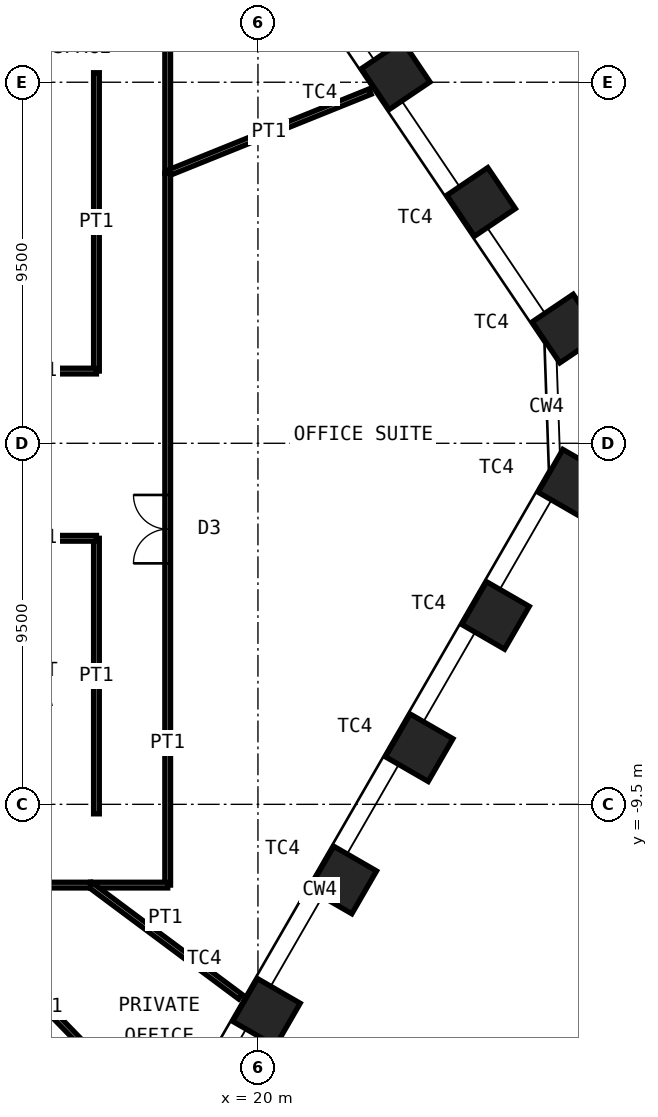
"""IFC4 building model, lengths in metres.
Left out: names, types, materials, properties, quantities, classifications, styles, units other than length and angle.
Written with IfcOpenShell. Run it as: python <this file> out.ifc"""

import sys

from ifc_helpers import new_model, si_unit, direction, frame, frame_2d, origin, origin_2d, place, context, subcontext, project, spatial, rectangle, hollow_rectangle, extrude, element, fill, save


model = new_model("IFC4")
c1 = context("Model", 3, precision=1e-05, world=origin(), true_north=direction((0.0, 1.0)))
c2 = subcontext(c1, "Body", "Model", "MODEL_VIEW")
j1 = project(units=[si_unit("LENGTHUNIT", "METRE"), si_unit("PLANEANGLEUNIT", "RADIAN")], contexts=[c1])
p1 = place(None, origin())
s1 = spatial("IfcSite", under=j1, at=p1, CompositionType="ELEMENT")
p2 = place(p1, origin())
s2 = spatial("IfcBuilding", under=s1, at=p2, CompositionType="ELEMENT")
p3 = place(p2, frame((0.0, 0.0, 166.0)))
s3 = spatial("IfcBuildingStorey", under=s2, at=p3, CompositionType="ELEMENT", Elevation=166.0)
for number, where, z_axis, x_axis in (
    (1, (23.625, 9.682, 0.0), (0.0, 0.0, 1.0), (-0.559, 0.829, 0.0)),
    (2, (25.872, 6.351, 0.0), (0.0, 0.0, 1.0), (-0.559, 0.829, 0.0)),
    (3, (28.119, 3.019, 0.0), (0.0, 0.0, 1.0), (-0.559, 0.829, 0.0)),
    (4, (28.261, -1.05, 0.0), (0.0, 0.0, 1.0), (0.5, 0.866, 0.0)),
    (5, (26.252, -4.53, 0.0), (0.0, 0.0, 1.0), (0.5, 0.866, 0.0)),
    (6, (24.242, -8.011, 0.0), (0.0, 0.0, 1.0), (0.5, 0.866, 0.0)),
    (7, (22.233, -11.491, 0.0), (0.0, 0.0, 1.0), (0.5, 0.866, 0.0)),
    (8, (20.223, -14.972, 0.0), (0.0, 0.0, 1.0), (0.5, 0.866, 0.0)),
):
    element("IfcColumn", number, at=place(p3, frame(where, z_axis=z_axis, x_axis=x_axis)), inside=s3, PredefinedType="COLUMN", context=c2, shape_type="SweptSolid", body=[
        extrude(hollow_rectangle(XDim=1.3, YDim=1.3, WallThickness=0.1, at=origin_2d()), origin(), (0.0, 0.0, 1.0), 4.2),
    ])
p4 = place(p3, frame((17.625, 11.625, 0.0), z_axis=(0.0, 0.0, 1.0), x_axis=(0.0, -1.0, 0.0)))
e9 = element("IfcWall", 9, at=p4, inside=s3, PredefinedType="PARTITIONING", context=c2, shape_type="SweptSolid", body=[
    extrude(rectangle(XDim=4.519, YDim=0.15, at=frame_2d((2.26, 0.0))), origin(), (0.0, 0.0, 1.0), 4.03),
])
p5 = place(p3, frame((22.951, 9.254, 0.0), z_axis=(0.0, 0.0, 1.0), x_axis=(-0.927444087873, -0.373961848147, 0.0)))
e10 = element("IfcWall", 10, at=p5, inside=s3, PredefinedType="PARTITIONING", context=c2, shape_type="SweptSolid", body=[
    extrude(rectangle(XDim=5.743, YDim=0.15, at=frame_2d((2.872, 0.0))), origin(), (0.0, 0.0, 1.0), 2.93),
])
p6 = place(p3, frame((17.625, 7.106, 0.0), z_axis=(0.0, 0.0, 1.0), x_axis=(0.0, -1.0, 0.0)))
e11 = element("IfcWall", 11, at=p6, inside=s3, PredefinedType="PARTITIONING", context=c2, shape_type="SweptSolid", body=[
    extrude(rectangle(XDim=18.731, YDim=0.15, at=frame_2d((9.365, 0.0))), origin(), (0.0, 0.0, 1.0), 4.03),
])
p7 = place(p6, frame((8.466, 0.0, 0.0)))
e12 = element("IfcOpeningElement", 12, at=p7, cuts=e11, PredefinedType="OPENING", context=c2, shape_type="SweptSolid", body=[
    extrude(rectangle(XDim=1.8, YDim=2.4, at=frame_2d((0.9, 1.2))), frame((0.0, 0.085, 0.0), z_axis=(0.0, -1.0, 0.0), x_axis=(1.0, 0.0, 0.0)), (0.0, 0.0, 1.0), 0.17),
])
p8 = place(p3, frame((17.625, -11.625, 0.0), z_axis=(0.0, 0.0, 1.0), x_axis=(-1.0, 0.0, 0.0)))
e13 = element("IfcWall", 13, at=p8, inside=s3, PredefinedType="PARTITIONING", context=c2, shape_type="SweptSolid", body=[
    extrude(rectangle(XDim=2.029, YDim=0.15, at=frame_2d((1.014, 0.0))), origin(), (0.0, 0.0, 1.0), 4.03),
])
p9 = place(p3, frame((19.537, -14.562, 0.0), z_axis=(0.0, 0.0, 1.0), x_axis=(-0.801778753003, 0.597620976233, 0.0)))
e14 = element("IfcWall", 14, at=p9, inside=s3, PredefinedType="PARTITIONING", context=c2, shape_type="SweptSolid", body=[
    extrude(rectangle(XDim=4.915, YDim=0.15, at=frame_2d((2.458, 0.0))), origin(), (0.0, 0.0, 1.0), 2.93),
])
p10 = place(p3, frame((15.596, -11.625, 0.0), z_axis=(0.0, 0.0, 1.0), x_axis=(-1.0, 0.0, 0.0)))
e15 = element("IfcWall", 15, at=p10, inside=s3, PredefinedType="PARTITIONING", context=c2, shape_type="SweptSolid", body=[
    extrude(rectangle(XDim=4.289, YDim=0.15, at=frame_2d((2.145, 0.0))), origin(), (0.0, 0.0, 1.0), 4.03),
])
p11 = place(p10, frame((1.645, 0.0, 0.0)))
e16 = element("IfcOpeningElement", 16, at=p11, cuts=e15, PredefinedType="OPENING", context=c2, shape_type="SweptSolid", body=[
    extrude(rectangle(XDim=1.0, YDim=2.4, at=frame_2d((0.5, 1.2))), frame((0.0, 0.085, 0.0), z_axis=(0.0, -1.0, 0.0), x_axis=(1.0, 0.0, 0.0)), (0.0, 0.0, 1.0), 0.17),
])
p12 = place(p3, frame((17.538, -18.031, 0.0), z_axis=(0.0, 0.0, 1.0), x_axis=(-0.697230918085, 0.716846599257, 0.0)))
e17 = element("IfcWall", 17, at=p12, inside=s3, PredefinedType="PARTITIONING", context=c2, shape_type="SweptSolid", body=[
    extrude(rectangle(XDim=8.936, YDim=0.15, at=frame_2d((4.468, 0.0))), origin(), (0.0, 0.0, 1.0), 2.93),
])
p13 = place(p3, frame((15.54, -21.502, 0.0), z_axis=(0.0, 0.0, 1.0), x_axis=(-0.585731902034, 0.810504866697, 0.0)))
e18 = element("IfcWall", 18, at=p13, inside=s3, PredefinedType="PARTITIONING", context=c2, shape_type="SweptSolid", body=[
    extrude(rectangle(XDim=12.187, YDim=0.15, at=frame_2d((6.093, 0.0))), origin(), (0.0, 0.0, 1.0), 3.03),
])
p14 = place(p3, frame((15.75, 1.9, 0.0), z_axis=(0.0, 0.0, 1.0), x_axis=(0.0, 1.0, 0.0)))
e19 = element("IfcWall", 19, at=p14, inside=s3, PredefinedType="PARTITIONING", context=c2, shape_type="SweptSolid", body=[
    extrude(rectangle(XDim=7.85, YDim=0.15, at=frame_2d((3.925, 0.0))), origin(), (0.0, 0.0, 1.0), 4.03),
])
p15 = place(p3, frame((12.75, 1.9, 0.0), z_axis=(0.0, 0.0, 1.0), x_axis=(1.0, 0.0, 0.0)))
e20 = element("IfcWall", 20, at=p15, inside=s3, PredefinedType="PARTITIONING", context=c2, shape_type="SweptSolid", body=[
    extrude(rectangle(XDim=3.0, YDim=0.15, at=frame_2d((1.5, 0.0))), origin(), (0.0, 0.0, 1.0), 3.03),
])
p16 = place(p3, frame((15.75, -9.75, 0.0), z_axis=(0.0, 0.0, 1.0), x_axis=(0.0, 1.0, 0.0)))
e21 = element("IfcWall", 21, at=p16, inside=s3, PredefinedType="PARTITIONING", context=c2, shape_type="SweptSolid", body=[
    extrude(rectangle(XDim=7.25, YDim=0.15, at=frame_2d((3.625, 0.0))), origin(), (0.0, 0.0, 1.0), 4.03),
])
p17 = place(p3, frame((12.75, -2.5, 0.0), z_axis=(0.0, 0.0, 1.0), x_axis=(1.0, 0.0, 0.0)))
e22 = element("IfcWall", 22, at=p17, inside=s3, PredefinedType="PARTITIONING", context=c2, shape_type="SweptSolid", body=[
    extrude(rectangle(XDim=3.0, YDim=0.15, at=frame_2d((1.5, 0.0))), origin(), (0.0, 0.0, 1.0), 2.93),
])
p18 = place(p7, origin())
e23 = element("IfcDoor", 23, at=p18, inside=s3, OperationType="DOUBLE_DOOR_DOUBLE_SWING", PredefinedType="DOOR", context=c2, shape_type="SweptSolid", body=[
    extrude(rectangle(XDim=1.8, YDim=2.4, at=frame_2d((0.9, 1.2))), frame((0.0, 0.025, 0.0), z_axis=(0.0, -1.0, 0.0), x_axis=(1.0, 0.0, 0.0)), (0.0, 0.0, 1.0), 0.05),
])
fill(e12, e23)
save(model, sys.argv[1])
